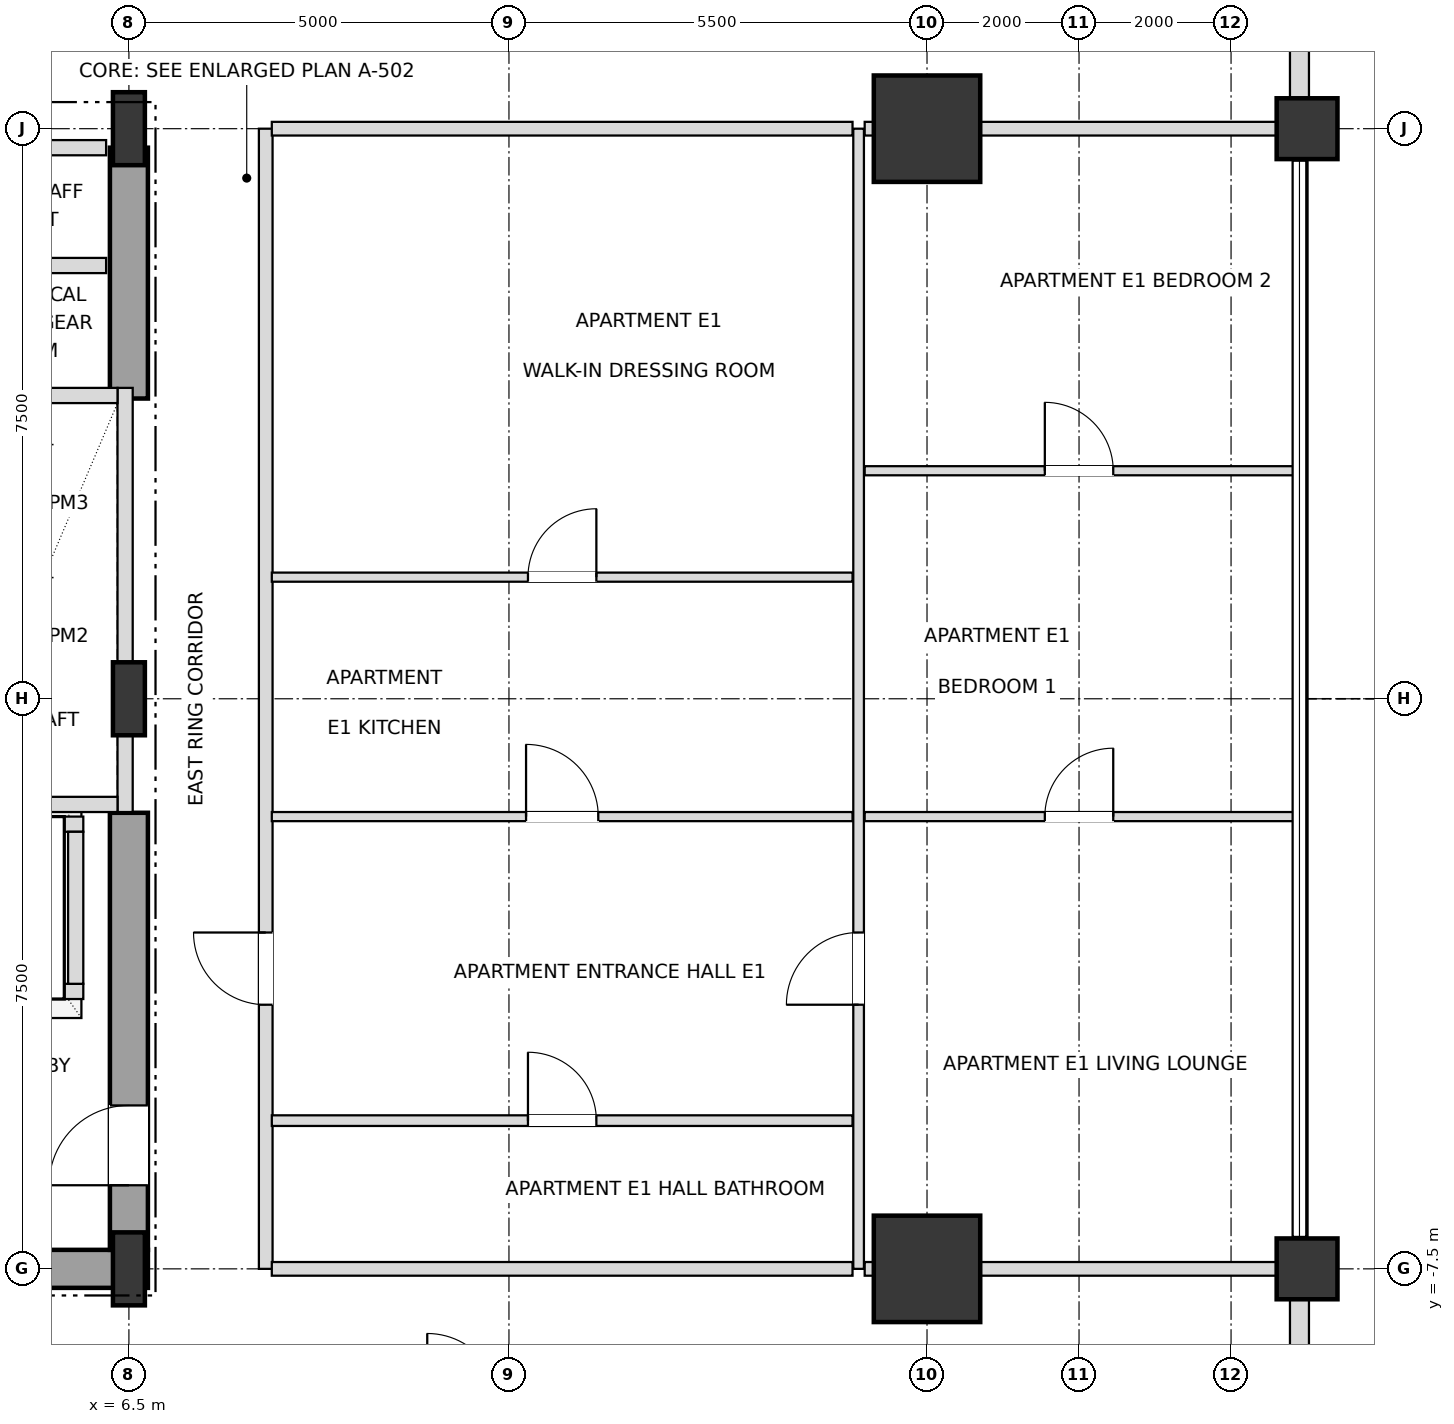
"""IFC4 building model, lengths in metres.
Left out: names, types, materials, properties, quantities, classifications, styles, units other than length and angle.
Written with IfcOpenShell. Run it as: python <this file> out.ifc"""

import sys

from ifc_helpers import new_model, si_unit, direction, frame, frame_2d, origin, origin_2d, place, context, subcontext, project, spatial, rectangle, i_section, extrude, element, fill, save


model = new_model("IFC4")
c1 = context("Model", 3, precision=1e-05, world=origin(), true_north=direction((0.0, 1.0)))
c2 = subcontext(c1, "Body", "Model", "MODEL_VIEW")
j1 = project(units=[si_unit("LENGTHUNIT", "METRE"), si_unit("PLANEANGLEUNIT", "RADIAN")], contexts=[c1])
p1 = place(None, origin())
s1 = spatial("IfcSite", under=j1, at=p1, CompositionType="ELEMENT")
p2 = place(p1, origin())
s2 = spatial("IfcBuilding", under=s1, at=p2, CompositionType="ELEMENT")
p3 = place(p2, frame((0.0, 0.0, 61.2)))
s3 = spatial("IfcBuildingStorey", under=s2, at=p3, CompositionType="ELEMENT", Elevation=61.2)
for number, where, z_axis, x_axis in (
    (1, (6.5, -7.5, 0.0), (0.0, 0.0, 1.0), (1.0, 0.0, 0.0)),
    (2, (6.5, 0.0, 0.0), (0.0, 0.0, 1.0), (1.0, 0.0, 0.0)),
    (3, (6.5, 7.5, 0.0), (0.0, 0.0, 1.0), (1.0, 0.0, 0.0)),
):
    element("IfcColumn", number, at=place(p3, frame(where, z_axis=z_axis, x_axis=x_axis)), inside=s3, PredefinedType="COLUMN", context=c2, shape_type="SweptSolid", body=[
        extrude(i_section(OverallWidth=0.42, OverallDepth=0.96, WebThickness=0.022, FlangeThickness=0.034, at=origin_2d()), origin(), (0.0, 0.0, 1.0), 3.6),
    ])
for number, where, z_axis, x_axis in (
    (4, (17.0, -7.5, 0.0), (0.0, 0.0, 1.0), (1.0, 0.0, 0.0)),
    (5, (17.0, 7.5, 0.0), (0.0, 0.0, 1.0), (1.0, 0.0, 0.0)),
):
    element("IfcColumn", number, at=place(p3, frame(where, z_axis=z_axis, x_axis=x_axis)), inside=s3, PredefinedType="USERDEFINED", context=c2, shape_type="SweptSolid", body=[
        extrude(rectangle(XDim=1.4, YDim=1.4, at=origin_2d()), origin(), (0.0, 0.0, 1.0), 3.6),
    ])
for number, where, z_axis, x_axis in (
    (6, (22.0, -7.5, 0.0), (0.0, 0.0, 1.0), (1.0, 0.0, 0.0)),
    (7, (22.0, 7.5, 0.0), (0.0, 0.0, 1.0), (1.0, 0.0, 0.0)),
):
    element("IfcColumn", number, at=place(p3, frame(where, z_axis=z_axis, x_axis=x_axis)), inside=s3, PredefinedType="COLUMN", context=c2, shape_type="SweptSolid", body=[
        extrude(rectangle(XDim=0.8, YDim=0.8, at=origin_2d()), origin(), (0.0, 0.0, 1.0), 3.6),
    ])
p4 = place(p3, frame((21.9, -12.605, 0.0), z_axis=(0.0, 0.0, 1.0), x_axis=(0.0, 1.0, 0.0)))
e8 = element("IfcWall", 8, at=p4, inside=s3, PredefinedType="SOLIDWALL", context=c2, shape_type="SweptSolid", body=[
    extrude(rectangle(XDim=4.71, YDim=0.25, at=frame_2d((2.355, 0.0))), origin(), (0.0, 0.0, 1.0), 2.736),
])
p5 = place(p4, frame((1.455, 0.0, 0.72)))
e9 = element("IfcOpeningElement", 9, at=p5, cuts=e8, PredefinedType="OPENING", context=c2, shape_type="SweptSolid", body=[
    extrude(rectangle(XDim=1.8, YDim=1.68, at=frame_2d((0.9, 0.84))), frame((0.0, 0.135, 0.0), z_axis=(0.0, -1.0, 0.0), x_axis=(1.0, 0.0, 0.0)), (0.0, 0.0, 1.0), 0.27),
])
p6 = place(p3, frame((21.9, 7.895, 0.0), z_axis=(0.0, 0.0, 1.0), x_axis=(0.0, 1.0, 0.0)))
e10 = element("IfcWall", 10, at=p6, inside=s3, PredefinedType="SOLIDWALL", context=c2, shape_type="SweptSolid", body=[
    extrude(rectangle(XDim=4.71, YDim=0.25, at=frame_2d((2.355, 0.0))), origin(), (0.0, 0.0, 1.0), 2.736),
])
p7 = place(p6, frame((1.455, 0.0, 0.72)))
e11 = element("IfcOpeningElement", 11, at=p7, cuts=e10, PredefinedType="OPENING", context=c2, shape_type="SweptSolid", body=[
    extrude(rectangle(XDim=1.8, YDim=1.68, at=frame_2d((0.9, 0.84))), frame((0.0, 0.135, 0.0), z_axis=(0.0, -1.0, 0.0), x_axis=(1.0, 0.0, 0.0)), (0.0, 0.0, 1.0), 0.27),
])
p8 = place(p3, frame((0.0, -7.5, 0.0), z_axis=(0.0, 0.0, 1.0), x_axis=(1.0, 0.0, 0.0)))
e12 = element("IfcWall", 12, at=p8, inside=s3, PredefinedType="SHEAR", context=c2, shape_type="SweptSolid", body=[
    extrude(rectangle(XDim=6.75, YDim=0.5, at=frame_2d((3.375, 0.0))), origin(), (0.0, 0.0, 1.0), 3.38),
])
p9 = place(p3, frame((6.5, -7.25, 0.0), z_axis=(0.0, 0.0, 1.0), x_axis=(0.0, 1.0, 0.0)))
e13 = element("IfcWall", 13, at=p9, inside=s3, PredefinedType="SHEAR", context=c2, shape_type="SweptSolid", body=[
    extrude(rectangle(XDim=5.75, YDim=0.5, at=frame_2d((2.875, 0.0))), origin(), (0.0, 0.0, 1.0), 3.38),
])
p10 = place(p9, frame((0.85, 0.0, 0.0)))
e14 = element("IfcOpeningElement", 14, at=p10, cuts=e13, PredefinedType="OPENING", context=c2, shape_type="SweptSolid", body=[
    extrude(rectangle(XDim=1.05, YDim=2.15, at=frame_2d((0.525, 1.075))), frame((0.0, 0.26, 0.0), z_axis=(0.0, -1.0, 0.0), x_axis=(1.0, 0.0, 0.0)), (0.0, 0.0, 1.0), 0.52),
])
p11 = place(p3, frame((6.5, 3.95, 0.0), z_axis=(0.0, 0.0, 1.0), x_axis=(0.0, 1.0, 0.0)))
e15 = element("IfcWall", 15, at=p11, inside=s3, PredefinedType="SHEAR", context=c2, shape_type="SweptSolid", body=[
    extrude(rectangle(XDim=3.3, YDim=0.5, at=frame_2d((1.65, 0.0))), origin(), (0.0, 0.0, 1.0), 3.38),
])
p12 = place(p3, frame((6.45, -1.49, 0.0), z_axis=(0.0, 0.0, 1.0), x_axis=(0.0, 1.0, 0.0)))
e16 = element("IfcWall", 16, at=p12, inside=s3, PredefinedType="SOLIDWALL", context=c2, shape_type="SweptSolid", body=[
    extrude(rectangle(XDim=5.58, YDim=0.2, at=frame_2d((2.79, 0.0))), origin(), (0.0, 0.0, 1.0), 2.816),
])
for number, where, z_axis, x_axis in (
    (17, (4.15, -1.39, 0.0), (0.0, 0.0, 1.0), (1.0, 0.0, 0.0)),
    (18, (4.15, 3.99, 0.0), (0.0, 0.0, 1.0), (1.0, 0.0, 0.0)),
):
    element("IfcWall", number, at=place(p3, frame(where, z_axis=z_axis, x_axis=x_axis)), inside=s3, PredefinedType="SOLIDWALL", context=c2, shape_type="SweptSolid", body=[
        extrude(rectangle(XDim=2.2, YDim=0.2, at=frame_2d((1.1, 0.0))), origin(), (0.0, 0.0, 1.0), 3.38),
    ])
p13 = place(p3, frame((1.8, -3.85, 0.0), z_axis=(0.0, 0.0, 1.0), x_axis=(1.0, 0.0, 0.0)))
e19 = element("IfcWall", 19, at=p13, inside=s3, PredefinedType="SOLIDWALL", context=c2, shape_type="SweptSolid", body=[
    extrude(rectangle(XDim=4.1, YDim=0.2, at=frame_2d((2.05, 0.0))), origin(), (0.0, 0.0, 1.0), 3.38),
])
p14 = place(p13, frame((0.45, 0.0, 0.0)))
e20 = element("IfcOpeningElement", 20, at=p14, cuts=e19, PredefinedType="OPENING", context=c2, shape_type="SweptSolid", body=[
    extrude(rectangle(XDim=1.2, YDim=2.2, at=frame_2d((0.6, 1.1))), frame((0.0, 0.11, 0.0), z_axis=(0.0, -1.0, 0.0), x_axis=(1.0, 0.0, 0.0)), (0.0, 0.0, 1.0), 0.22),
])
p15 = place(p13, frame((2.45, 0.0, 0.0)))
e21 = element("IfcOpeningElement", 21, at=p15, cuts=e19, PredefinedType="OPENING", context=c2, shape_type="SweptSolid", body=[
    extrude(rectangle(XDim=1.2, YDim=2.2, at=frame_2d((0.6, 1.1))), frame((0.0, 0.11, 0.0), z_axis=(0.0, -1.0, 0.0), x_axis=(1.0, 0.0, 0.0)), (0.0, 0.0, 1.0), 0.22),
])
p16 = place(p3, frame((1.8, -1.65, 0.0), z_axis=(0.0, 0.0, 1.0), x_axis=(1.0, 0.0, 0.0)))
e22 = element("IfcWall", 22, at=p16, inside=s3, PredefinedType="SOLIDWALL", context=c2, shape_type="SweptSolid", body=[
    extrude(rectangle(XDim=4.1, YDim=0.2, at=frame_2d((2.05, 0.0))), origin(), (0.0, 0.0, 1.0), 3.38),
])
p17 = place(p3, frame((5.8, -3.75, 0.0), z_axis=(0.0, 0.0, 1.0), x_axis=(0.0, 1.0, 0.0)))
e23 = element("IfcWall", 23, at=p17, inside=s3, PredefinedType="SOLIDWALL", context=c2, shape_type="SweptSolid", body=[
    extrude(rectangle(XDim=2.0, YDim=0.2, at=frame_2d((1.0, 0.0))), origin(), (0.0, 0.0, 1.0), 3.38),
])
p18 = place(p3, frame((8.3, -7.5, 0.0), z_axis=(0.0, 0.0, 1.0), x_axis=(0.0, 1.0, 0.0)))
e24 = element("IfcWall", 24, at=p18, inside=s3, PredefinedType="PARTITIONING", context=c2, shape_type="SweptSolid", body=[
    extrude(rectangle(XDim=15.0, YDim=0.18, at=frame_2d((7.5, 0.0))), origin(), (0.0, 0.0, 1.0), 3.38),
])
p19 = place(p18, frame((3.475, 0.0, 0.0)))
e25 = element("IfcOpeningElement", 25, at=p19, cuts=e24, PredefinedType="OPENING", context=c2, shape_type="SweptSolid", body=[
    extrude(rectangle(XDim=0.95, YDim=2.15, at=frame_2d((0.475, 1.075))), frame((0.0, 0.1, 0.0), z_axis=(0.0, -1.0, 0.0), x_axis=(1.0, 0.0, 0.0)), (0.0, 0.0, 1.0), 0.2),
])
p20 = place(p3, frame((16.1, -7.5, 0.0), z_axis=(0.0, 0.0, 1.0), x_axis=(0.0, 1.0, 0.0)))
e26 = element("IfcWall", 26, at=p20, inside=s3, PredefinedType="PARTITIONING", context=c2, shape_type="SweptSolid", body=[
    extrude(rectangle(XDim=15.0, YDim=0.14, at=frame_2d((7.5, 0.0))), origin(), (0.0, 0.0, 1.0), 3.38),
])
p21 = place(p20, frame((3.475, 0.0, 0.0)))
e27 = element("IfcOpeningElement", 27, at=p21, cuts=e26, PredefinedType="OPENING", context=c2, shape_type="SweptSolid", body=[
    extrude(rectangle(XDim=0.95, YDim=2.1, at=frame_2d((0.475, 1.05))), frame((0.0, 0.08, 0.0), z_axis=(0.0, -1.0, 0.0), x_axis=(1.0, 0.0, 0.0)), (0.0, 0.0, 1.0), 0.16),
])
p22 = place(p3, frame((8.38, -7.5, 0.0), z_axis=(0.0, 0.0, 1.0), x_axis=(1.0, 0.0, 0.0)))
e28 = element("IfcWall", 28, at=p22, inside=s3, PredefinedType="PARTITIONING", context=c2, shape_type="SweptSolid", body=[
    extrude(rectangle(XDim=7.64, YDim=0.18, at=frame_2d((3.82, 0.0))), origin(), (0.0, 0.0, 1.0), 2.816),
])
p23 = place(p3, frame((16.18, -7.5, 0.0), z_axis=(0.0, 0.0, 1.0), x_axis=(1.0, 0.0, 0.0)))
e29 = element("IfcWall", 29, at=p23, inside=s3, PredefinedType="PARTITIONING", context=c2, shape_type="SweptSolid", body=[
    extrude(rectangle(XDim=5.72, YDim=0.18, at=frame_2d((2.86, 0.0))), origin(), (0.0, 0.0, 1.0), 2.816),
])
p24 = place(p3, frame((8.38, -5.55, 0.0), z_axis=(0.0, 0.0, 1.0), x_axis=(1.0, 0.0, 0.0)))
e30 = element("IfcWall", 30, at=p24, inside=s3, PredefinedType="PARTITIONING", context=c2, shape_type="SweptSolid", body=[
    extrude(rectangle(XDim=7.64, YDim=0.14, at=frame_2d((3.82, 0.0))), origin(), (0.0, 0.0, 1.0), 2.948),
])
p25 = place(p24, frame((3.37, 0.0, 0.0)))
e31 = element("IfcOpeningElement", 31, at=p25, cuts=e30, PredefinedType="OPENING", context=c2, shape_type="SweptSolid", body=[
    extrude(rectangle(XDim=0.9, YDim=2.1, at=frame_2d((0.45, 1.05))), frame((0.0, 0.08, 0.0), z_axis=(0.0, -1.0, 0.0), x_axis=(1.0, 0.0, 0.0)), (0.0, 0.0, 1.0), 0.16),
])
p26 = place(p3, frame((8.38, -1.55, 0.0), z_axis=(0.0, 0.0, 1.0), x_axis=(1.0, 0.0, 0.0)))
e32 = element("IfcWall", 32, at=p26, inside=s3, PredefinedType="PARTITIONING", context=c2, shape_type="SweptSolid", body=[
    extrude(rectangle(XDim=7.64, YDim=0.12, at=frame_2d((3.82, 0.0))), origin(), (0.0, 0.0, 1.0), 2.948),
])
p27 = place(p26, frame((3.345, 0.0, 0.0)))
e33 = element("IfcOpeningElement", 33, at=p27, cuts=e32, PredefinedType="OPENING", context=c2, shape_type="SweptSolid", body=[
    extrude(rectangle(XDim=0.95, YDim=2.1, at=frame_2d((0.475, 1.05))), frame((0.0, 0.07, 0.0), z_axis=(0.0, -1.0, 0.0), x_axis=(1.0, 0.0, 0.0)), (0.0, 0.0, 1.0), 0.14),
])
p28 = place(p3, frame((16.18, -1.55, 0.0), z_axis=(0.0, 0.0, 1.0), x_axis=(1.0, 0.0, 0.0)))
e34 = element("IfcWall", 34, at=p28, inside=s3, PredefinedType="PARTITIONING", context=c2, shape_type="SweptSolid", body=[
    extrude(rectangle(XDim=5.64, YDim=0.12, at=frame_2d((2.82, 0.0))), origin(), (0.0, 0.0, 1.0), 2.816),
])
p29 = place(p28, frame((2.37, 0.0, 0.0)))
e35 = element("IfcOpeningElement", 35, at=p29, cuts=e34, PredefinedType="OPENING", context=c2, shape_type="SweptSolid", body=[
    extrude(rectangle(XDim=0.9, YDim=2.1, at=frame_2d((0.45, 1.05))), frame((0.0, 0.07, 0.0), z_axis=(0.0, -1.0, 0.0), x_axis=(1.0, 0.0, 0.0)), (0.0, 0.0, 1.0), 0.14),
])
p30 = place(p3, frame((8.38, 1.6, 0.0), z_axis=(0.0, 0.0, 1.0), x_axis=(1.0, 0.0, 0.0)))
e36 = element("IfcWall", 36, at=p30, inside=s3, PredefinedType="PARTITIONING", context=c2, shape_type="SweptSolid", body=[
    extrude(rectangle(XDim=7.64, YDim=0.12, at=frame_2d((3.82, 0.0))), origin(), (0.0, 0.0, 1.0), 2.948),
])
p31 = place(p30, frame((3.37, 0.0, 0.0)))
e37 = element("IfcOpeningElement", 37, at=p31, cuts=e36, PredefinedType="OPENING", context=c2, shape_type="SweptSolid", body=[
    extrude(rectangle(XDim=0.9, YDim=2.1, at=frame_2d((0.45, 1.05))), frame((0.0, 0.07, 0.0), z_axis=(0.0, -1.0, 0.0), x_axis=(1.0, 0.0, 0.0)), (0.0, 0.0, 1.0), 0.14),
])
p32 = place(p3, frame((16.18, 3.0, 0.0), z_axis=(0.0, 0.0, 1.0), x_axis=(1.0, 0.0, 0.0)))
e38 = element("IfcWall", 38, at=p32, inside=s3, PredefinedType="PARTITIONING", context=c2, shape_type="SweptSolid", body=[
    extrude(rectangle(XDim=5.64, YDim=0.12, at=frame_2d((2.82, 0.0))), origin(), (0.0, 0.0, 1.0), 2.816),
])
p33 = place(p32, frame((2.37, 0.0, 0.0)))
e39 = element("IfcOpeningElement", 39, at=p33, cuts=e38, PredefinedType="OPENING", context=c2, shape_type="SweptSolid", body=[
    extrude(rectangle(XDim=0.9, YDim=2.1, at=frame_2d((0.45, 1.05))), frame((0.0, 0.07, 0.0), z_axis=(0.0, -1.0, 0.0), x_axis=(1.0, 0.0, 0.0)), (0.0, 0.0, 1.0), 0.14),
])
for number, where, z_axis, x_axis in (
    (40, (4.13, 5.7, 0.0), (0.0, 0.0, 1.0), (1.0, 0.0, 0.0)),
    (41, (4.13, 7.25, 0.0), (0.0, 0.0, 1.0), (1.0, 0.0, 0.0)),
):
    element("IfcWall", number, at=place(p3, frame(where, z_axis=z_axis, x_axis=x_axis)), inside=s3, PredefinedType="SOLIDWALL", context=c2, shape_type="SweptSolid", body=[
        extrude(rectangle(XDim=2.07, YDim=0.2, at=frame_2d((1.035, 0.0))), origin(), (0.0, 0.0, 1.0), 3.38),
    ])
p34 = place(p3, frame((8.38, 7.5, 0.0), z_axis=(0.0, 0.0, 1.0), x_axis=(1.0, 0.0, 0.0)))
e42 = element("IfcWall", 42, at=p34, inside=s3, PredefinedType="PARTITIONING", context=c2, shape_type="SweptSolid", body=[
    extrude(rectangle(XDim=7.64, YDim=0.18, at=frame_2d((3.82, 0.0))), origin(), (0.0, 0.0, 1.0), 2.816),
])
p35 = place(p3, frame((16.18, 7.5, 0.0), z_axis=(0.0, 0.0, 1.0), x_axis=(1.0, 0.0, 0.0)))
e43 = element("IfcWall", 43, at=p35, inside=s3, PredefinedType="PARTITIONING", context=c2, shape_type="SweptSolid", body=[
    extrude(rectangle(XDim=5.72, YDim=0.18, at=frame_2d((2.86, 0.0))), origin(), (0.0, 0.0, 1.0), 2.816),
])
p36 = place(p10, origin())
e44 = element("IfcDoor", 44, at=p36, inside=s3, OperationType="SINGLE_SWING_LEFT", PredefinedType="DOOR", context=c2, shape_type="SweptSolid", body=[
    extrude(rectangle(XDim=1.05, YDim=2.15, at=frame_2d((0.525, 1.075))), frame((0.0, 0.025, 0.0), z_axis=(0.0, -1.0, 0.0), x_axis=(1.0, 0.0, 0.0)), (0.0, 0.0, 1.0), 0.05),
])
fill(e14, e44)
p37 = place(p25, origin())
e45 = element("IfcDoor", 45, at=p37, inside=s3, OperationType="SINGLE_SWING_LEFT", PredefinedType="DOOR", context=c2, shape_type="SweptSolid", body=[
    extrude(rectangle(XDim=0.9, YDim=2.1, at=frame_2d((0.45, 1.05))), frame((0.0, 0.025, 0.0), z_axis=(0.0, -1.0, 0.0), x_axis=(1.0, 0.0, 0.0)), (0.0, 0.0, 1.0), 0.05),
])
fill(e31, e45)
p38 = place(p19, origin())
e46 = element("IfcDoor", 46, at=p38, inside=s3, OperationType="SINGLE_SWING_RIGHT", PredefinedType="DOOR", context=c2, shape_type="SweptSolid", body=[
    extrude(rectangle(XDim=0.95, YDim=2.15, at=frame_2d((0.475, 1.075))), frame((0.0, 0.025, 0.0), z_axis=(0.0, -1.0, 0.0), x_axis=(1.0, 0.0, 0.0)), (0.0, 0.0, 1.0), 0.05),
])
fill(e25, e46)
p39 = place(p27, origin())
e47 = element("IfcDoor", 47, at=p39, inside=s3, OperationType="SINGLE_SWING_LEFT", PredefinedType="DOOR", context=c2, shape_type="SweptSolid", body=[
    extrude(rectangle(XDim=0.95, YDim=2.1, at=frame_2d((0.475, 1.05))), frame((0.0, 0.025, 0.0), z_axis=(0.0, -1.0, 0.0), x_axis=(1.0, 0.0, 0.0)), (0.0, 0.0, 1.0), 0.05),
])
fill(e33, e47)
p40 = place(p31, origin())
e48 = element("IfcDoor", 48, at=p40, inside=s3, OperationType="SINGLE_SWING_RIGHT", PredefinedType="DOOR", context=c2, shape_type="SweptSolid", body=[
    extrude(rectangle(XDim=0.9, YDim=2.1, at=frame_2d((0.45, 1.05))), frame((0.0, 0.025, 0.0), z_axis=(0.0, -1.0, 0.0), x_axis=(1.0, 0.0, 0.0)), (0.0, 0.0, 1.0), 0.05),
])
fill(e37, e48)
p41 = place(p21, origin())
e49 = element("IfcDoor", 49, at=p41, inside=s3, OperationType="SINGLE_SWING_LEFT", PredefinedType="DOOR", context=c2, shape_type="SweptSolid", body=[
    extrude(rectangle(XDim=0.95, YDim=2.1, at=frame_2d((0.475, 1.05))), frame((0.0, 0.025, 0.0), z_axis=(0.0, -1.0, 0.0), x_axis=(1.0, 0.0, 0.0)), (0.0, 0.0, 1.0), 0.05),
])
fill(e27, e49)
p42 = place(p29, origin())
e50 = element("IfcDoor", 50, at=p42, inside=s3, OperationType="SINGLE_SWING_RIGHT", PredefinedType="DOOR", context=c2, shape_type="SweptSolid", body=[
    extrude(rectangle(XDim=0.9, YDim=2.1, at=frame_2d((0.45, 1.05))), frame((0.0, 0.025, 0.0), z_axis=(0.0, -1.0, 0.0), x_axis=(1.0, 0.0, 0.0)), (0.0, 0.0, 1.0), 0.05),
])
fill(e35, e50)
p43 = place(p33, origin())
e51 = element("IfcDoor", 51, at=p43, inside=s3, OperationType="SINGLE_SWING_LEFT", PredefinedType="DOOR", context=c2, shape_type="SweptSolid", body=[
    extrude(rectangle(XDim=0.9, YDim=2.1, at=frame_2d((0.45, 1.05))), frame((0.0, 0.025, 0.0), z_axis=(0.0, -1.0, 0.0), x_axis=(1.0, 0.0, 0.0)), (0.0, 0.0, 1.0), 0.05),
])
fill(e39, e51)
save(model, sys.argv[1])
